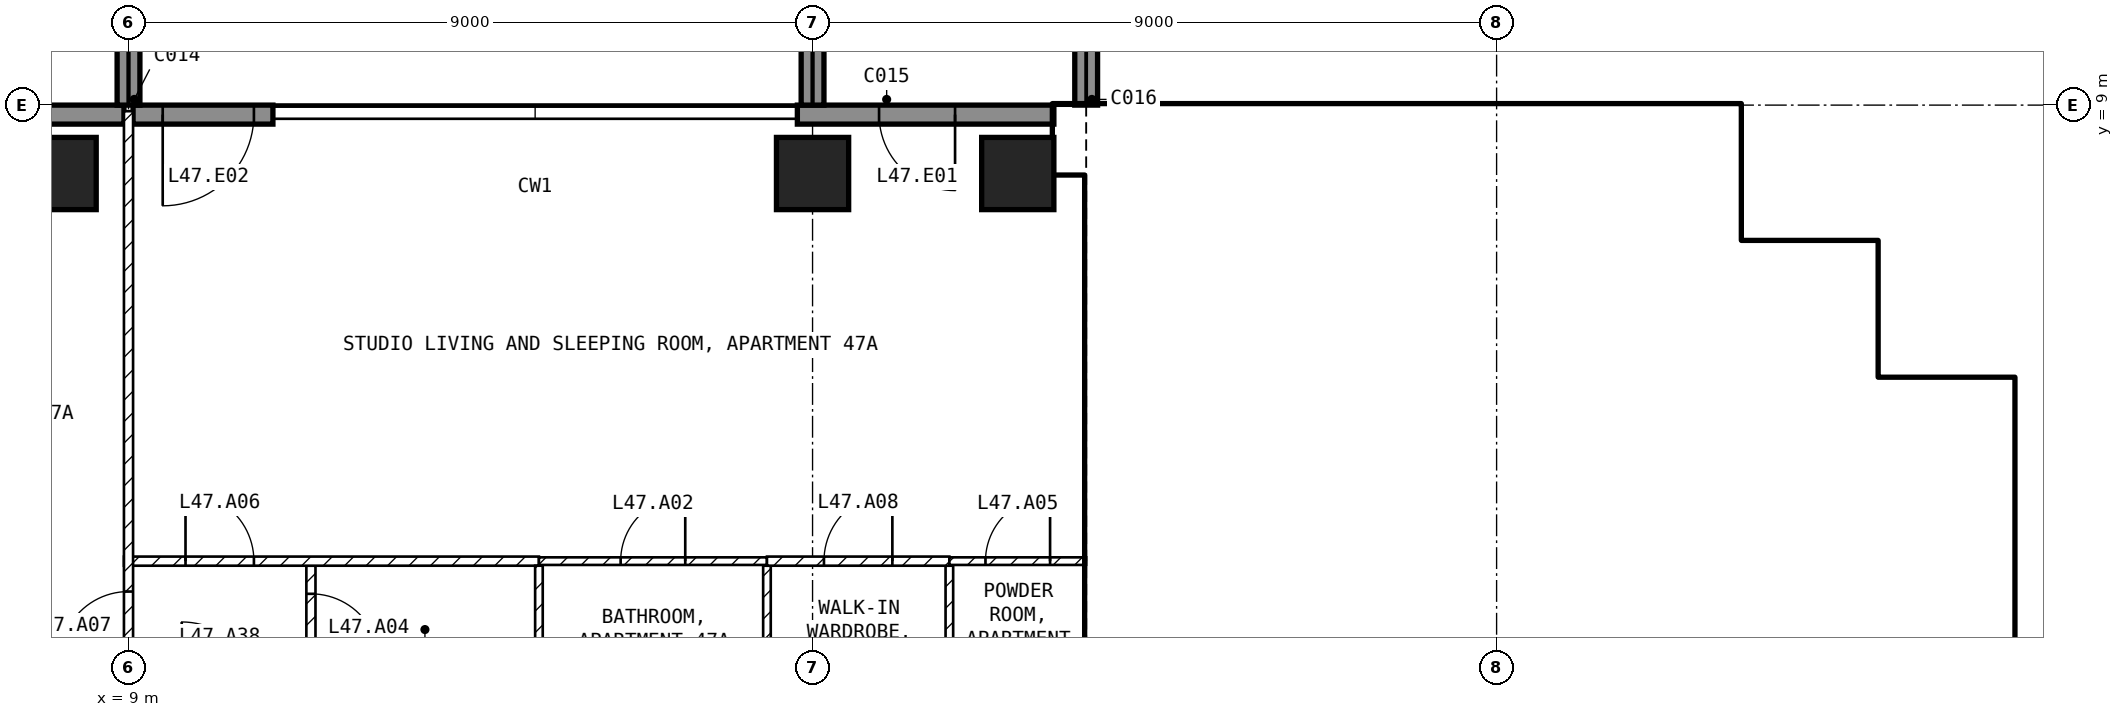
"""IFC4 building model, lengths in metres.
Left out: names, types, materials, properties, quantities, classifications, styles, units other than length and angle.
Written with IfcOpenShell. Run it as: python <this file> out.ifc"""

import sys

from ifc_helpers import new_model, si_unit, direction, frame, frame_2d, origin, origin_2d, place, context, subcontext, project, spatial, rectangle, extrude, element, fill, save


model = new_model("IFC4")
c1 = context("Model", 3, precision=1e-05, world=origin(), true_north=direction((0.0, 1.0)))
c2 = subcontext(c1, "Body", "Model", "MODEL_VIEW")
j1 = project(units=[si_unit("LENGTHUNIT", "METRE"), si_unit("PLANEANGLEUNIT", "RADIAN")], contexts=[c1])
p1 = place(None, origin())
s1 = spatial("IfcSite", under=j1, at=p1, CompositionType="ELEMENT")
p2 = place(p1, origin())
s2 = spatial("IfcBuilding", under=s1, at=p2, CompositionType="ELEMENT")
p3 = place(p2, frame((0.0, 0.0, 191.1)))
s3 = spatial("IfcBuildingStorey", under=s2, at=p3, CompositionType="ELEMENT", Elevation=191.1)
for number, where, z_axis, x_axis in (
    (1, (8.1, 8.1, -0.25), (0.0, 0.0, 1.0), (1.0, 0.0, 0.0)),
    (2, (18.0, 8.1, -0.25), (0.0, 0.0, 1.0), (1.0, 0.0, 0.0)),
    (3, (20.7, 8.1, -0.25), (0.0, 0.0, 1.0), (1.0, 0.0, 0.0)),
):
    element("IfcColumn", number, at=place(p3, frame(where, z_axis=z_axis, x_axis=x_axis)), inside=s3, PredefinedType="COLUMN", context=c2, shape_type="SweptSolid", body=[
        extrude(rectangle(XDim=0.95, YDim=0.95, at=origin_2d()), origin(), (0.0, 0.0, 1.0), 3.5),
    ])
p4 = place(p3, frame((21.175, 8.875, 0.0), z_axis=(0.0, 0.0, 1.0), x_axis=(-1.0, 0.0, 0.0)))
e4 = element("IfcWall", 4, at=p4, inside=s3, PredefinedType="SOLIDWALL", context=c2, shape_type="SweptSolid", body=[
    extrude(rectangle(XDim=3.375, YDim=0.25, at=frame_2d((1.688, 0.0))), origin(), (0.0, 0.0, 1.0), 3.25),
])
p5 = place(p4, frame((1.3, 0.0, 0.0)))
e5 = element("IfcOpeningElement", 5, at=p5, cuts=e4, PredefinedType="OPENING", context=c2, shape_type="SweptSolid", body=[
    extrude(rectangle(XDim=1.0, YDim=2.4, at=frame_2d((0.5, 1.2))), frame((0.0, 0.135, 0.0), z_axis=(0.0, -1.0, 0.0), x_axis=(1.0, 0.0, 0.0)), (0.0, 0.0, 1.0), 0.27),
])
p6 = place(p3, frame((10.9, 8.875, 0.0), z_axis=(0.0, 0.0, 1.0), x_axis=(-1.0, 0.0, 0.0)))
e6 = element("IfcWall", 6, at=p6, inside=s3, PredefinedType="SOLIDWALL", context=c2, shape_type="SweptSolid", body=[
    extrude(rectangle(XDim=1.84, YDim=0.25, at=frame_2d((0.92, 0.0))), origin(), (0.0, 0.0, 1.0), 3.25),
])
p7 = place(p6, frame((0.25, 0.0, 0.0)))
e7 = element("IfcOpeningElement", 7, at=p7, cuts=e6, PredefinedType="OPENING", context=c2, shape_type="SweptSolid", body=[
    extrude(rectangle(XDim=1.2, YDim=2.4, at=frame_2d((0.6, 1.2))), frame((0.0, 0.135, 0.0), z_axis=(0.0, -1.0, 0.0), x_axis=(1.0, 0.0, 0.0)), (0.0, 0.0, 1.0), 0.27),
])
p8 = place(p3, frame((8.94, 8.875, 0.0), z_axis=(0.0, 0.0, 1.0), x_axis=(-1.0, 0.0, 0.0)))
e8 = element("IfcWall", 8, at=p8, inside=s3, PredefinedType="SOLIDWALL", context=c2, shape_type="SweptSolid", body=[
    extrude(rectangle(XDim=3.115, YDim=0.25, at=frame_2d((1.558, 0.0))), origin(), (0.0, 0.0, 1.0), 3.25),
])
p9 = place(p8, frame((1.665, 0.0, 0.0)))
e9 = element("IfcOpeningElement", 9, at=p9, cuts=e8, PredefinedType="OPENING", context=c2, shape_type="SweptSolid", body=[
    extrude(rectangle(XDim=1.2, YDim=2.4, at=frame_2d((0.6, 1.2))), frame((0.0, 0.135, 0.0), z_axis=(0.0, -1.0, 0.0), x_axis=(1.0, 0.0, 0.0)), (0.0, 0.0, 1.0), 0.27),
])
for number, where, z_axis, x_axis in (
    (10, (9.0, 9.0, 0.0), (0.0, 0.0, 1.0), (0.0, 1.0, 0.0)),
    (11, (18.0, 9.0, 0.0), (0.0, 0.0, 1.0), (0.0, 1.0, 0.0)),
    (12, (21.6, 9.0, 0.0), (0.0, 0.0, 1.0), (0.0, 1.0, 0.0)),
):
    element("IfcWall", number, at=place(p3, frame(where, z_axis=z_axis, x_axis=x_axis)), inside=s3, PredefinedType="SOLIDWALL", context=c2, shape_type="SweptSolid", body=[
        extrude(rectangle(XDim=2.7, YDim=0.3, at=frame_2d((1.35, 0.0))), origin(), (0.0, 0.0, 1.0), 3.25),
    ])
p10 = place(p3, frame((33.5, -4.8, 0.0), z_axis=(0.0, 0.0, 1.0), x_axis=(0.0, 1.0, 0.0)))
e13 = element("IfcWall", 13, at=p10, inside=s3, PredefinedType="SHEAR", context=c2, shape_type="SweptSolid", body=[
    extrude(rectangle(XDim=10.2, YDim=0.6, at=frame_2d((5.1, 0.0))), origin(), (0.0, 0.0, 1.0), 3.25),
])
for number, where, z_axis, x_axis in (
    (14, (31.4, 5.1, 0.0), (0.0, 0.0, 1.0), (1.0, 0.0, 0.0)),
    (15, (31.7, 5.4, 0.0), (0.0, 0.0, 1.0), (0.0, 1.0, 0.0)),
):
    element("IfcWall", number, at=place(p3, frame(where, z_axis=z_axis, x_axis=x_axis)), inside=s3, PredefinedType="SHEAR", context=c2, shape_type="SweptSolid", body=[
        extrude(rectangle(XDim=1.8, YDim=0.6, at=frame_2d((0.9, 0.0))), origin(), (0.0, 0.0, 1.0), 3.25),
    ])
p11 = place(p3, frame((29.075, 6.9, 0.0), z_axis=(0.0, 0.0, 1.0), x_axis=(1.0, 0.0, 0.0)))
e16 = element("IfcWall", 16, at=p11, inside=s3, PredefinedType="SHEAR", context=c2, shape_type="SweptSolid", body=[
    extrude(rectangle(XDim=2.325, YDim=0.6, at=frame_2d((1.163, 0.0))), origin(), (0.0, 0.0, 1.0), 3.25),
])
p12 = place(p3, frame((29.9, 7.2, 0.0), z_axis=(0.0, 0.0, 1.0), x_axis=(0.0, 1.0, 0.0)))
e17 = element("IfcWall", 17, at=p12, inside=s3, PredefinedType="SHEAR", context=c2, shape_type="SweptSolid", body=[
    extrude(rectangle(XDim=1.8, YDim=0.6, at=frame_2d((0.9, 0.0))), origin(), (0.0, 0.0, 1.0), 3.25),
])
p13 = place(p3, frame((21.175, 8.55, 0.0), z_axis=(0.0, 0.0, 1.0), x_axis=(1.0, 0.0, 0.0)))
e18 = element("IfcWall", 18, at=p13, inside=s3, PredefinedType="SHEAR", context=c2, shape_type="SweptSolid", body=[
    extrude(rectangle(XDim=8.425, YDim=0.9, at=frame_2d((4.212, 0.0))), origin(), (0.0, 0.0, 1.0), 3.25),
])
p14 = place(p3, frame((21.825, 1.2, 0.0), z_axis=(0.0, 0.0, 1.0), x_axis=(0.0, 1.0, 0.0)))
e19 = element("IfcWall", 19, at=p14, inside=s3, PredefinedType="SHEAR", context=c2, shape_type="SweptSolid", body=[
    extrude(rectangle(XDim=6.9, YDim=0.45, at=frame_2d((3.45, 0.0))), origin(), (0.0, 0.0, 1.0), 3.25),
])
p15 = place(p3, frame((22.05, 5.15, 0.0), z_axis=(0.0, 0.0, 1.0), x_axis=(1.0, 0.0, 0.0)))
e20 = element("IfcWall", 20, at=p15, inside=s3, PredefinedType="SOLIDWALL", context=c2, shape_type="SweptSolid", body=[
    extrude(rectangle(XDim=6.3, YDim=0.2, at=frame_2d((3.15, 0.0))), origin(), (0.0, 0.0, 1.0), 3.25),
])
p16 = place(p15, frame((0.2, 0.0, 0.0)))
e21 = element("IfcOpeningElement", 21, at=p16, cuts=e20, PredefinedType="OPENING", context=c2, shape_type="SweptSolid", body=[
    extrude(rectangle(XDim=1.0, YDim=2.1, at=frame_2d((0.5, 1.05))), frame((0.0, 0.11, 0.0), z_axis=(0.0, -1.0, 0.0), x_axis=(1.0, 0.0, 0.0)), (0.0, 0.0, 1.0), 0.22),
])
p17 = place(p3, frame((28.25, 5.25, 0.0), z_axis=(0.0, 0.0, 1.0), x_axis=(0.0, 1.0, 0.0)))
e22 = element("IfcWall", 22, at=p17, inside=s3, PredefinedType="SOLIDWALL", context=c2, shape_type="SweptSolid", body=[
    extrude(rectangle(XDim=2.85, YDim=0.2, at=frame_2d((1.425, 0.0))), origin(), (0.0, 0.0, 1.0), 3.25),
])
p18 = place(p3, frame((27.2, 3.95, 0.0), z_axis=(0.0, 0.0, 1.0), x_axis=(1.0, 0.0, 0.0)))
e23 = element("IfcWall", 23, at=p18, inside=s3, PredefinedType="SOLIDWALL", context=c2, shape_type="SweptSolid", body=[
    extrude(rectangle(XDim=6.0, YDim=0.2, at=frame_2d((3.0, 0.0))), origin(), (0.0, 0.0, 1.0), 3.25),
])
p19 = place(p3, frame((27.1, 1.55, 0.0), z_axis=(0.0, 0.0, 1.0), x_axis=(0.0, 1.0, 0.0)))
e24 = element("IfcWall", 24, at=p19, inside=s3, PredefinedType="SOLIDWALL", context=c2, shape_type="SweptSolid", body=[
    extrude(rectangle(XDim=3.5, YDim=0.2, at=frame_2d((1.75, 0.0))), origin(), (0.0, 0.0, 1.0), 3.25),
])
p20 = place(p19, frame((0.6, 0.0, 0.0)))
e25 = element("IfcOpeningElement", 25, at=p20, cuts=e24, PredefinedType="OPENING", context=c2, shape_type="SweptSolid", body=[
    extrude(rectangle(XDim=1.1, YDim=2.1, at=frame_2d((0.55, 1.05))), frame((0.0, 0.11, 0.0), z_axis=(0.0, -1.0, 0.0), x_axis=(1.0, 0.0, 0.0)), (0.0, 0.0, 1.0), 0.22),
])
p21 = place(p19, frame((2.6, 0.0, 0.0)))
e26 = element("IfcOpeningElement", 26, at=p21, cuts=e24, PredefinedType="OPENING", context=c2, shape_type="SweptSolid", body=[
    extrude(rectangle(XDim=0.8, YDim=2.1, at=frame_2d((0.4, 1.05))), frame((0.0, 0.11, 0.0), z_axis=(0.0, -1.0, 0.0), x_axis=(1.0, 0.0, 0.0)), (0.0, 0.0, 1.0), 0.22),
])
p22 = place(p3, frame((30.0, 1.55, 0.0), z_axis=(0.0, 0.0, 1.0), x_axis=(0.0, 1.0, 0.0)))
e27 = element("IfcWall", 27, at=p22, inside=s3, PredefinedType="SOLIDWALL", context=c2, shape_type="SweptSolid", body=[
    extrude(rectangle(XDim=2.3, YDim=0.2, at=frame_2d((1.15, 0.0))), origin(), (0.0, 0.0, 1.0), 3.25),
])
p23 = place(p3, frame((29.0, 4.05, 0.0), z_axis=(0.0, 0.0, 1.0), x_axis=(0.0, 1.0, 0.0)))
e28 = element("IfcWall", 28, at=p23, inside=s3, PredefinedType="PARTITIONING", context=c2, shape_type="SweptSolid", body=[
    extrude(rectangle(XDim=4.05, YDim=0.15, at=frame_2d((2.025, 0.0))), origin(), (0.0, 0.0, 1.0), 3.25),
])
p24 = place(p23, frame((0.1, 0.0, 0.0)))
e29 = element("IfcOpeningElement", 29, at=p24, cuts=e28, PredefinedType="OPENING", context=c2, shape_type="SweptSolid", body=[
    extrude(rectangle(XDim=0.8, YDim=2.1, at=frame_2d((0.4, 1.05))), frame((0.0, 0.085, 0.0), z_axis=(0.0, -1.0, 0.0), x_axis=(1.0, 0.0, 0.0)), (0.0, 0.0, 1.0), 0.17),
])
p25 = place(p3, frame((11.4, 2.94, 0.0), z_axis=(0.0, 0.0, 1.0), x_axis=(0.0, -1.0, 0.0)))
e30 = element("IfcWall", 30, at=p25, inside=s3, PredefinedType="PARTITIONING", context=c2, shape_type="SweptSolid", body=[
    extrude(rectangle(XDim=1.64, YDim=0.12, at=frame_2d((0.82, 0.0))), origin(), (0.0, 0.0, 1.0), 3.25),
])
p26 = place(p25, frame((0.37, 0.0, 0.0)))
e31 = element("IfcOpeningElement", 31, at=p26, cuts=e30, PredefinedType="OPENING", context=c2, shape_type="SweptSolid", body=[
    extrude(rectangle(XDim=0.9, YDim=2.1, at=frame_2d((0.45, 1.05))), frame((0.0, 0.07, 0.0), z_axis=(0.0, -1.0, 0.0), x_axis=(1.0, 0.0, 0.0)), (0.0, 0.0, 1.0), 0.14),
])
p27 = place(p3, frame((8.94, 3.0, 0.0), z_axis=(0.0, 0.0, 1.0), x_axis=(1.0, 0.0, 0.0)))
e32 = element("IfcWall", 32, at=p27, inside=s3, PredefinedType="PARTITIONING", context=c2, shape_type="SweptSolid", body=[
    extrude(rectangle(XDim=5.46, YDim=0.12, at=frame_2d((2.73, 0.0))), origin(), (0.0, 0.0, 1.0), 3.25),
])
p28 = place(p27, frame((0.81, 0.0, 0.0)))
e33 = element("IfcOpeningElement", 33, at=p28, cuts=e32, PredefinedType="OPENING", context=c2, shape_type="SweptSolid", body=[
    extrude(rectangle(XDim=0.9, YDim=2.1, at=frame_2d((0.45, 1.05))), frame((0.0, 0.07, 0.0), z_axis=(0.0, -1.0, 0.0), x_axis=(1.0, 0.0, 0.0)), (0.0, 0.0, 1.0), 0.14),
])
p29 = place(p3, frame((9.0, 1.3, 0.0), z_axis=(0.0, 0.0, 1.0), x_axis=(0.0, 1.0, 0.0)))
e34 = element("IfcWall", 34, at=p29, inside=s3, PredefinedType="PARTITIONING", context=c2, shape_type="SweptSolid", body=[
    extrude(rectangle(XDim=7.62, YDim=0.12, at=frame_2d((3.81, 0.0))), origin(), (0.0, 0.0, 1.0), 3.25),
])
p30 = place(p29, frame((0.4, 0.0, 0.0)))
e35 = element("IfcOpeningElement", 35, at=p30, cuts=e34, PredefinedType="OPENING", context=c2, shape_type="SweptSolid", body=[
    extrude(rectangle(XDim=0.9, YDim=2.1, at=frame_2d((0.45, 1.05))), frame((0.0, 0.07, 0.0), z_axis=(0.0, -1.0, 0.0), x_axis=(1.0, 0.0, 0.0)), (0.0, 0.0, 1.0), 0.14),
])
for number, where, z_axis, x_axis in (
    (36, (14.4, 2.94, 0.0), (0.0, 0.0, 1.0), (0.0, -1.0, 0.0)),
    (37, (17.4, 2.94, 0.0), (0.0, 0.0, 1.0), (0.0, -1.0, 0.0)),
):
    element("IfcWall", number, at=place(p3, frame(where, z_axis=z_axis, x_axis=x_axis)), inside=s3, PredefinedType="PARTITIONING", context=c2, shape_type="SweptSolid", body=[
        extrude(rectangle(XDim=1.64, YDim=0.1, at=frame_2d((0.82, 0.0))), origin(), (0.0, 0.0, 1.0), 3.25),
    ])
p31 = place(p3, frame((14.4, 3.0, 0.0), z_axis=(0.0, 0.0, 1.0), x_axis=(1.0, 0.0, 0.0)))
e38 = element("IfcWall", 38, at=p31, inside=s3, PredefinedType="PARTITIONING", context=c2, shape_type="SweptSolid", body=[
    extrude(rectangle(XDim=3.0, YDim=0.1, at=frame_2d((1.5, 0.0))), origin(), (0.0, 0.0, 1.0), 3.25),
])
p32 = place(p31, frame((1.075, 0.0, 0.0)))
e39 = element("IfcOpeningElement", 39, at=p32, cuts=e38, PredefinedType="OPENING", context=c2, shape_type="SweptSolid", body=[
    extrude(rectangle(XDim=0.85, YDim=2.1, at=frame_2d((0.425, 1.05))), frame((0.0, 0.06, 0.0), z_axis=(0.0, -1.0, 0.0), x_axis=(1.0, 0.0, 0.0)), (0.0, 0.0, 1.0), 0.12),
])
p33 = place(p3, frame((19.8, 2.94, 0.0), z_axis=(0.0, 0.0, 1.0), x_axis=(0.0, -1.0, 0.0)))
e40 = element("IfcWall", 40, at=p33, inside=s3, PredefinedType="PARTITIONING", context=c2, shape_type="SweptSolid", body=[
    extrude(rectangle(XDim=1.64, YDim=0.1, at=frame_2d((0.82, 0.0))), origin(), (0.0, 0.0, 1.0), 3.25),
])
p34 = place(p3, frame((17.4, 3.0, 0.0), z_axis=(0.0, 0.0, 1.0), x_axis=(1.0, 0.0, 0.0)))
e41 = element("IfcWall", 41, at=p34, inside=s3, PredefinedType="PARTITIONING", context=c2, shape_type="SweptSolid", body=[
    extrude(rectangle(XDim=2.4, YDim=0.12, at=frame_2d((1.2, 0.0))), origin(), (0.0, 0.0, 1.0), 3.25),
])
p35 = place(p34, frame((0.75, 0.0, 0.0)))
e42 = element("IfcOpeningElement", 42, at=p35, cuts=e41, PredefinedType="OPENING", context=c2, shape_type="SweptSolid", body=[
    extrude(rectangle(XDim=0.9, YDim=2.1, at=frame_2d((0.45, 1.05))), frame((0.0, 0.07, 0.0), z_axis=(0.0, -1.0, 0.0), x_axis=(1.0, 0.0, 0.0)), (0.0, 0.0, 1.0), 0.14),
])
p36 = place(p3, frame((19.8, 3.0, 0.0), z_axis=(0.0, 0.0, 1.0), x_axis=(1.0, 0.0, 0.0)))
e43 = element("IfcWall", 43, at=p36, inside=s3, PredefinedType="PARTITIONING", context=c2, shape_type="SweptSolid", body=[
    extrude(rectangle(XDim=1.8, YDim=0.1, at=frame_2d((0.9, 0.0))), origin(), (0.0, 0.0, 1.0), 3.25),
])
p37 = place(p36, frame((0.475, 0.0, 0.0)))
e44 = element("IfcOpeningElement", 44, at=p37, cuts=e43, PredefinedType="OPENING", context=c2, shape_type="SweptSolid", body=[
    extrude(rectangle(XDim=0.85, YDim=2.1, at=frame_2d((0.425, 1.05))), frame((0.0, 0.06, 0.0), z_axis=(0.0, -1.0, 0.0), x_axis=(1.0, 0.0, 0.0)), (0.0, 0.0, 1.0), 0.12),
])
p38 = place(p5, origin())
e45 = element("IfcDoor", 45, at=p38, inside=s3, OperationType="SINGLE_SWING_LEFT", PredefinedType="DOOR", context=c2, shape_type="SweptSolid", body=[
    extrude(rectangle(XDim=1.0, YDim=2.4, at=frame_2d((0.5, 1.2))), frame((0.0, 0.025, 0.0), z_axis=(0.0, -1.0, 0.0), x_axis=(1.0, 0.0, 0.0)), (0.0, 0.0, 1.0), 0.05),
])
fill(e5, e45)
p39 = place(p7, origin())
e46 = element("IfcDoor", 46, at=p39, inside=s3, OperationType="SINGLE_SWING_RIGHT", PredefinedType="DOOR", context=c2, shape_type="SweptSolid", body=[
    extrude(rectangle(XDim=1.2, YDim=2.4, at=frame_2d((0.6, 1.2))), frame((0.0, 0.025, 0.0), z_axis=(0.0, -1.0, 0.0), x_axis=(1.0, 0.0, 0.0)), (0.0, 0.0, 1.0), 0.05),
])
fill(e7, e46)
p40 = place(p20, origin())
e47 = element("IfcDoor", 47, at=p40, inside=s3, OperationType="DOUBLE_DOOR_SLIDING", PredefinedType="DOOR", context=c2, shape_type="SweptSolid", body=[
    extrude(rectangle(XDim=1.1, YDim=2.1, at=frame_2d((0.55, 1.05))), frame((0.0, 0.025, 0.0), z_axis=(0.0, -1.0, 0.0), x_axis=(1.0, 0.0, 0.0)), (0.0, 0.0, 1.0), 0.05),
])
fill(e25, e47)
p41 = place(p16, origin())
e48 = element("IfcDoor", 48, at=p41, inside=s3, OperationType="SINGLE_SWING_LEFT", PredefinedType="DOOR", context=c2, shape_type="SweptSolid", body=[
    extrude(rectangle(XDim=1.0, YDim=2.1, at=frame_2d((0.5, 1.05))), frame((0.0, 0.025, 0.0), z_axis=(0.0, -1.0, 0.0), x_axis=(1.0, 0.0, 0.0)), (0.0, 0.0, 1.0), 0.05),
])
fill(e21, e48)
p42 = place(p21, origin())
e49 = element("IfcDoor", 49, at=p42, inside=s3, OperationType="SINGLE_SWING_LEFT", PredefinedType="DOOR", context=c2, shape_type="SweptSolid", body=[
    extrude(rectangle(XDim=0.8, YDim=2.1, at=frame_2d((0.4, 1.05))), frame((0.0, 0.025, 0.0), z_axis=(0.0, -1.0, 0.0), x_axis=(1.0, 0.0, 0.0)), (0.0, 0.0, 1.0), 0.05),
])
fill(e26, e49)
p43 = place(p24, origin())
e50 = element("IfcDoor", 50, at=p43, inside=s3, OperationType="SINGLE_SWING_LEFT", PredefinedType="DOOR", context=c2, shape_type="SweptSolid", body=[
    extrude(rectangle(XDim=0.8, YDim=2.1, at=frame_2d((0.4, 1.05))), frame((0.0, 0.025, 0.0), z_axis=(0.0, -1.0, 0.0), x_axis=(1.0, 0.0, 0.0)), (0.0, 0.0, 1.0), 0.05),
])
fill(e29, e50)
p44 = place(p32, origin())
e51 = element("IfcDoor", 51, at=p44, inside=s3, OperationType="SINGLE_SWING_RIGHT", PredefinedType="DOOR", context=c2, shape_type="SweptSolid", body=[
    extrude(rectangle(XDim=0.85, YDim=2.1, at=frame_2d((0.425, 1.05))), frame((0.0, 0.025, 0.0), z_axis=(0.0, -1.0, 0.0), x_axis=(1.0, 0.0, 0.0)), (0.0, 0.0, 1.0), 0.05),
])
fill(e39, e51)
p45 = place(p26, origin())
e52 = element("IfcDoor", 52, at=p45, inside=s3, OperationType="SINGLE_SWING_RIGHT", PredefinedType="DOOR", context=c2, shape_type="SweptSolid", body=[
    extrude(rectangle(XDim=0.9, YDim=2.1, at=frame_2d((0.45, 1.05))), frame((0.0, 0.025, 0.0), z_axis=(0.0, -1.0, 0.0), x_axis=(1.0, 0.0, 0.0)), (0.0, 0.0, 1.0), 0.05),
])
fill(e31, e52)
p46 = place(p37, origin())
e53 = element("IfcDoor", 53, at=p46, inside=s3, OperationType="SINGLE_SWING_RIGHT", PredefinedType="DOOR", context=c2, shape_type="SweptSolid", body=[
    extrude(rectangle(XDim=0.85, YDim=2.1, at=frame_2d((0.425, 1.05))), frame((0.0, 0.025, 0.0), z_axis=(0.0, -1.0, 0.0), x_axis=(1.0, 0.0, 0.0)), (0.0, 0.0, 1.0), 0.05),
])
fill(e44, e53)
p47 = place(p28, origin())
e54 = element("IfcDoor", 54, at=p47, inside=s3, OperationType="SINGLE_SWING_LEFT", PredefinedType="DOOR", context=c2, shape_type="SweptSolid", body=[
    extrude(rectangle(XDim=0.9, YDim=2.1, at=frame_2d((0.45, 1.05))), frame((0.0, 0.025, 0.0), z_axis=(0.0, -1.0, 0.0), x_axis=(1.0, 0.0, 0.0)), (0.0, 0.0, 1.0), 0.05),
])
fill(e33, e54)
p48 = place(p30, origin())
e55 = element("IfcDoor", 55, at=p48, inside=s3, OperationType="SINGLE_SWING_LEFT", PredefinedType="DOOR", context=c2, shape_type="SweptSolid", body=[
    extrude(rectangle(XDim=0.9, YDim=2.1, at=frame_2d((0.45, 1.05))), frame((0.0, 0.025, 0.0), z_axis=(0.0, -1.0, 0.0), x_axis=(1.0, 0.0, 0.0)), (0.0, 0.0, 1.0), 0.05),
])
fill(e35, e55)
p49 = place(p35, origin())
e56 = element("IfcDoor", 56, at=p49, inside=s3, OperationType="SINGLE_SWING_RIGHT", PredefinedType="DOOR", context=c2, shape_type="SweptSolid", body=[
    extrude(rectangle(XDim=0.9, YDim=2.1, at=frame_2d((0.45, 1.05))), frame((0.0, 0.025, 0.0), z_axis=(0.0, -1.0, 0.0), x_axis=(1.0, 0.0, 0.0)), (0.0, 0.0, 1.0), 0.05),
])
fill(e42, e56)
save(model, sys.argv[1])
